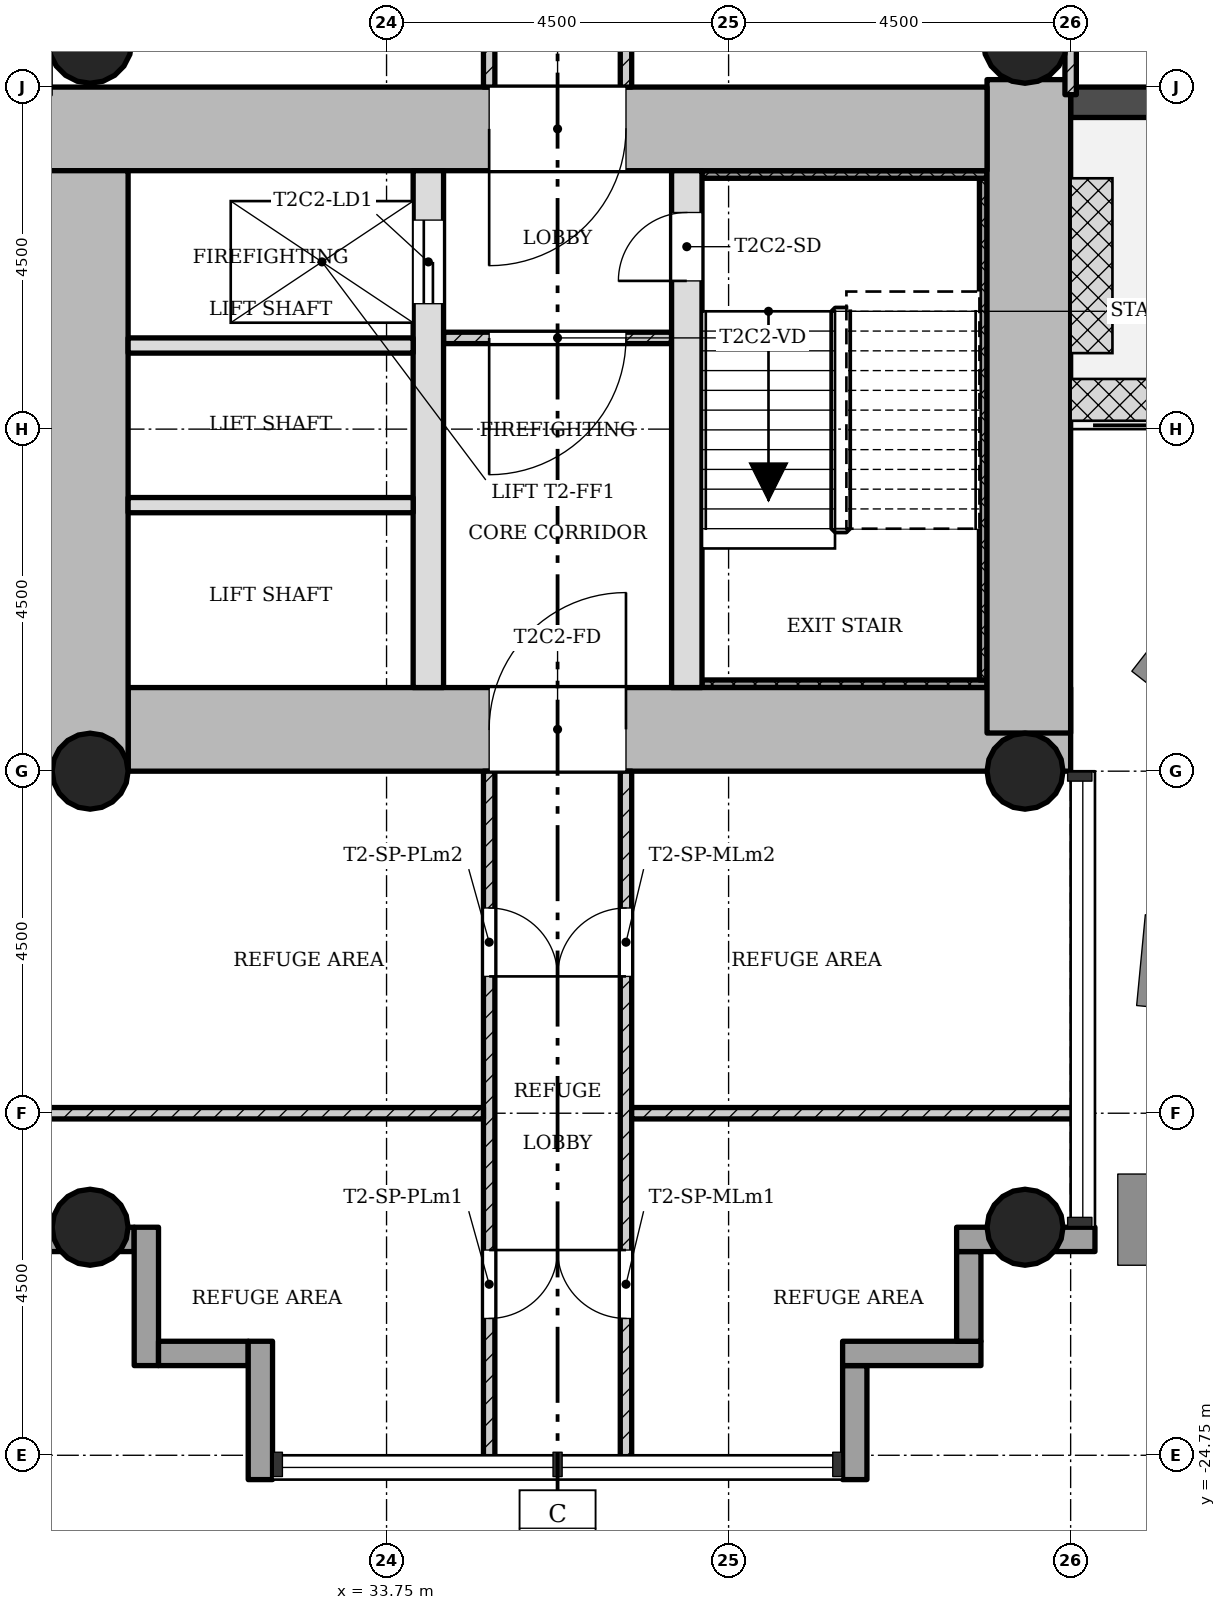
"""IFC4 building model, lengths in metres.
Left out: names, types, materials, properties, quantities, classifications, styles, units other than length and angle.
Written with IfcOpenShell. Run it as: python <this file> out.ifc"""

import sys

from ifc_helpers import new_model, si_unit, direction, frame, frame_2d, origin, origin_2d, place, context, subcontext, project, spatial, rectangle, hollow_circle, extrude, element, fill, save


model = new_model("IFC4")
c1 = context("Model", 3, precision=1e-05, world=origin(), true_north=direction((0.0, 1.0)))
c2 = subcontext(c1, "Body", "Model", "MODEL_VIEW")
j1 = project(units=[si_unit("LENGTHUNIT", "METRE"), si_unit("PLANEANGLEUNIT", "RADIAN")], contexts=[c1])
p1 = place(None, origin())
s1 = spatial("IfcSite", under=j1, at=p1, CompositionType="ELEMENT")
p2 = place(p1, origin())
s2 = spatial("IfcBuilding", under=s1, at=p2, CompositionType="ELEMENT")
p3 = place(p2, frame((0.0, 0.0, 72.1)))
s3 = spatial("IfcBuildingStorey", under=s2, at=p3, CompositionType="ELEMENT", Elevation=72.1)
p4 = place(p3, frame((30.35, -15.2, 0.0), z_axis=(0.0, 0.0, 1.0), x_axis=(1.0, 0.0, 0.0)))
e1 = element("IfcWall", 1, at=p4, inside=s3, PredefinedType="SHEAR", context=c2, shape_type="SweptSolid", body=[
    extrude(rectangle(XDim=12.4, YDim=1.1, at=frame_2d((6.2, 0.0))), origin(), (0.0, 0.0, 1.0), 4.5),
])
p5 = place(p4, frame((4.75, 0.0, 0.0)))
e2 = element("IfcOpeningElement", 2, at=p5, cuts=e1, PredefinedType="OPENING", context=c2, shape_type="SweptSolid", body=[
    extrude(rectangle(XDim=1.8, YDim=2.1, at=frame_2d((0.9, 1.05))), frame((0.0, 0.56, 0.0), z_axis=(0.0, -1.0, 0.0), x_axis=(1.0, 0.0, 0.0)), (0.0, 0.0, 1.0), 1.12),
])
p6 = place(p3, frame((42.2, -15.248, 0.0), z_axis=(0.0, 0.0, 1.0), x_axis=(0.0, 1.0, 0.0)))
e3 = element("IfcWall", 3, at=p6, inside=s3, PredefinedType="SHEAR", context=c2, shape_type="SweptSolid", body=[
    extrude(rectangle(XDim=8.596, YDim=1.1, at=frame_2d((4.298, 0.0))), origin(), (0.0, 0.0, 1.0), 4.5),
])
p7 = place(p3, frame((41.65, -7.3, 0.0), z_axis=(0.0, 0.0, 1.0), x_axis=(-1.0, 0.0, 0.0)))
e4 = element("IfcWall", 4, at=p7, inside=s3, PredefinedType="SHEAR", context=c2, shape_type="SweptSolid", body=[
    extrude(rectangle(XDim=12.4, YDim=1.1, at=frame_2d((6.2, 0.0))), origin(), (0.0, 0.0, 1.0), 4.5),
])
p8 = place(p7, frame((4.75, 0.0, 0.0)))
e5 = element("IfcOpeningElement", 5, at=p8, cuts=e4, PredefinedType="OPENING", context=c2, shape_type="SweptSolid", body=[
    extrude(rectangle(XDim=1.8, YDim=2.1, at=frame_2d((0.9, 1.05))), frame((0.0, 0.56, 0.0), z_axis=(0.0, -1.0, 0.0), x_axis=(1.0, 0.0, 0.0)), (0.0, 0.0, 1.0), 1.12),
])
p9 = place(p3, frame((29.8, -7.85, 0.0), z_axis=(0.0, 0.0, 1.0), x_axis=(0.0, -1.0, 0.0)))
e6 = element("IfcWall", 6, at=p9, inside=s3, PredefinedType="SHEAR", context=c2, shape_type="SweptSolid", body=[
    extrude(rectangle(XDim=7.9, YDim=1.1, at=frame_2d((3.95, 0.0))), origin(), (0.0, 0.0, 1.0), 4.5),
])
p10 = place(p3, frame((34.3, -14.65, 0.0), z_axis=(0.0, 0.0, 1.0), x_axis=(0.0, 1.0, 0.0)))
e7 = element("IfcWall", 7, at=p10, inside=s3, PredefinedType="SHEAR", context=c2, shape_type="SweptSolid", body=[
    extrude(rectangle(XDim=6.8, YDim=0.4, at=frame_2d((3.4, 0.0))), origin(), (0.0, 0.0, 1.0), 4.5),
])
p11 = place(p10, frame((5.05, 0.0, 0.0)))
e8 = element("IfcOpeningElement", 8, at=p11, cuts=e7, PredefinedType="OPENING", context=c2, shape_type="SweptSolid", body=[
    extrude(rectangle(XDim=1.1, YDim=2.1, at=frame_2d((0.55, 1.05))), frame((0.0, 0.21, 0.0), z_axis=(0.0, -1.0, 0.0), x_axis=(1.0, 0.0, 0.0)), (0.0, 0.0, 1.0), 0.42),
])
p12 = place(p3, frame((37.7, -14.65, 0.0), z_axis=(0.0, 0.0, 1.0), x_axis=(0.0, 1.0, 0.0)))
e9 = element("IfcWall", 9, at=p12, inside=s3, PredefinedType="SHEAR", context=c2, shape_type="SweptSolid", body=[
    extrude(rectangle(XDim=6.8, YDim=0.4, at=frame_2d((3.4, 0.0))), origin(), (0.0, 0.0, 1.0), 4.5),
])
p13 = place(p12, frame((5.35, 0.0, 0.0)))
e10 = element("IfcOpeningElement", 10, at=p13, cuts=e9, PredefinedType="OPENING", context=c2, shape_type="SweptSolid", body=[
    extrude(rectangle(XDim=0.9, YDim=2.1, at=frame_2d((0.45, 1.05))), frame((0.0, 0.21, 0.0), z_axis=(0.0, -1.0, 0.0), x_axis=(1.0, 0.0, 0.0)), (0.0, 0.0, 1.0), 0.42),
])
for number, where, z_axis, x_axis in (
    (11, (42.15, -15.75, 0.0), (0.0, 0.0, 1.0), (1.0, 0.0, 0.0)),
    (12, (29.85, -15.75, 0.0), (0.0, 0.0, 1.0), (1.0, 0.0, 0.0)),
    (13, (42.15, -21.75, 0.0), (0.0, 0.0, 1.0), (1.0, 0.0, 0.0)),
    (14, (29.85, -21.75, 0.0), (0.0, 0.0, 1.0), (1.0, 0.0, 0.0)),
):
    element("IfcColumn", number, at=place(p3, frame(where, z_axis=z_axis, x_axis=x_axis)), inside=s3, PredefinedType="COLUMN", context=c2, shape_type="SweptSolid", body=[
        extrude(hollow_circle(Radius=0.5, WallThickness=0.036, at=origin_2d()), origin(), (0.0, 0.0, 1.0), 4.5),
    ])
for number, where, z_axis, x_axis in (
    (15, (42.15, -6.15, 0.0), (0.0, 0.0, 1.0), (1.0, 0.0, 0.0)),
    (16, (29.85, -6.15, 0.0), (0.0, 0.0, 1.0), (1.0, 0.0, 0.0)),
):
    element("IfcColumn", number, at=place(p3, frame(where, z_axis=z_axis, x_axis=x_axis)), inside=s3, PredefinedType="COLUMN", context=c2, shape_type="SweptSolid", body=[
        extrude(hollow_circle(Radius=0.55, WallThickness=0.04, at=origin_2d()), origin(), (0.0, 0.0, 1.0), 4.5),
    ])
p14 = place(p3, frame((39.91, -25.07, -0.3), z_axis=(0.0, 0.0, 1.0), x_axis=(0.0, 1.0, 0.0)))
e17 = element("IfcWall", 17, at=p14, inside=s3, PredefinedType="STANDARD", context=c2, shape_type="SweptSolid", body=[
    extrude(rectangle(XDim=1.5, YDim=0.32, at=frame_2d((0.75, 0.0))), origin(), (0.0, 0.0, 1.0), 4.5),
])
p15 = place(p3, frame((39.75, -23.41, -0.3), z_axis=(0.0, 0.0, 1.0), x_axis=(1.0, 0.0, 0.0)))
e18 = element("IfcWall", 18, at=p15, inside=s3, PredefinedType="STANDARD", context=c2, shape_type="SweptSolid", body=[
    extrude(rectangle(XDim=1.82, YDim=0.32, at=frame_2d((0.91, 0.0))), origin(), (0.0, 0.0, 1.0), 4.5),
])
p16 = place(p3, frame((41.41, -23.25, -0.3), z_axis=(0.0, 0.0, 1.0), x_axis=(0.0, 1.0, 0.0)))
e19 = element("IfcWall", 19, at=p16, inside=s3, PredefinedType="STANDARD", context=c2, shape_type="SweptSolid", body=[
    extrude(rectangle(XDim=1.18, YDim=0.32, at=frame_2d((0.59, 0.0))), origin(), (0.0, 0.0, 1.0), 4.5),
])
p17 = place(p3, frame((41.25, -21.91, -0.3), z_axis=(0.0, 0.0, 1.0), x_axis=(1.0, 0.0, 0.0)))
e20 = element("IfcWall", 20, at=p17, inside=s3, PredefinedType="STANDARD", context=c2, shape_type="SweptSolid", body=[
    extrude(rectangle(XDim=1.82, YDim=0.32, at=frame_2d((0.91, 0.0))), origin(), (0.0, 0.0, 1.0), 4.5),
])
p18 = place(p3, frame((42.75, -6.95, -0.02), z_axis=(0.0, 0.0, 1.0), x_axis=(1.0, 0.0, 0.0)))
e21 = element("IfcWall", 21, at=p18, inside=s3, PredefinedType="STANDARD", context=c2, shape_type="SweptSolid", body=[
    extrude(rectangle(XDim=4.5, YDim=0.4, at=frame_2d((2.25, 0.0))), origin(), (0.0, 0.0, 1.0), 4.22),
])
p19 = place(p18, frame((1.35, 0.0, 0.02)))
e22 = element("IfcOpeningElement", 22, at=p19, cuts=e21, PredefinedType="OPENING", context=c2, shape_type="SweptSolid", body=[
    extrude(rectangle(XDim=1.8, YDim=2.1, at=frame_2d((0.9, 1.05))), frame((0.0, 0.21, 0.0), z_axis=(0.0, -1.0, 0.0), x_axis=(1.0, 0.0, 0.0)), (0.0, 0.0, 1.0), 0.42),
])
p20 = place(p3, frame((28.93, -21.91, -0.3), z_axis=(0.0, 0.0, 1.0), x_axis=(1.0, 0.0, 0.0)))
e23 = element("IfcWall", 23, at=p20, inside=s3, PredefinedType="STANDARD", context=c2, shape_type="SweptSolid", body=[
    extrude(rectangle(XDim=1.5, YDim=0.32, at=frame_2d((0.75, 0.0))), origin(), (0.0, 0.0, 1.0), 4.5),
])
p21 = place(p3, frame((30.59, -21.75, -0.3), z_axis=(0.0, 0.0, 1.0), x_axis=(0.0, -1.0, 0.0)))
e24 = element("IfcWall", 24, at=p21, inside=s3, PredefinedType="STANDARD", context=c2, shape_type="SweptSolid", body=[
    extrude(rectangle(XDim=1.82, YDim=0.32, at=frame_2d((0.91, 0.0))), origin(), (0.0, 0.0, 1.0), 4.5),
])
p22 = place(p3, frame((30.75, -23.41, -0.3), z_axis=(0.0, 0.0, 1.0), x_axis=(1.0, 0.0, 0.0)))
e25 = element("IfcWall", 25, at=p22, inside=s3, PredefinedType="STANDARD", context=c2, shape_type="SweptSolid", body=[
    extrude(rectangle(XDim=1.18, YDim=0.32, at=frame_2d((0.59, 0.0))), origin(), (0.0, 0.0, 1.0), 4.5),
])
p23 = place(p3, frame((32.09, -23.25, -0.3), z_axis=(0.0, 0.0, 1.0), x_axis=(0.0, -1.0, 0.0)))
e26 = element("IfcWall", 26, at=p23, inside=s3, PredefinedType="STANDARD", context=c2, shape_type="SweptSolid", body=[
    extrude(rectangle(XDim=1.82, YDim=0.32, at=frame_2d((0.91, 0.0))), origin(), (0.0, 0.0, 1.0), 4.5),
])
p24 = place(p3, frame((34.5, -10.05, 0.0), z_axis=(0.0, 0.0, 1.0), x_axis=(1.0, 0.0, 0.0)))
e27 = element("IfcWall", 27, at=p24, inside=s3, PredefinedType="PARTITIONING", context=c2, shape_type="SweptSolid", body=[
    extrude(rectangle(XDim=3.0, YDim=0.15, at=frame_2d((1.5, 0.0))), origin(), (0.0, 0.0, 1.0), 4.08),
])
p25 = place(p24, frame((0.6, 0.0, 0.0)))
e28 = element("IfcOpeningElement", 28, at=p25, cuts=e27, PredefinedType="OPENING", context=c2, shape_type="SweptSolid", body=[
    extrude(rectangle(XDim=1.8, YDim=2.1, at=frame_2d((0.9, 1.05))), frame((0.0, 0.085, 0.0), z_axis=(0.0, -1.0, 0.0), x_axis=(1.0, 0.0, 0.0)), (0.0, 0.0, 1.0), 0.17),
])
for number, where, z_axis, x_axis in (
    (29, (30.35, -10.15, 0.0), (0.0, 0.0, 1.0), (1.0, 0.0, 0.0)),
    (30, (30.35, -12.25, 0.0), (0.0, 0.0, 1.0), (1.0, 0.0, 0.0)),
):
    element("IfcWall", number, at=place(p3, frame(where, z_axis=z_axis, x_axis=x_axis)), inside=s3, PredefinedType="SOLIDWALL", context=c2, shape_type="SweptSolid", body=[
        extrude(rectangle(XDim=3.75, YDim=0.2, at=frame_2d((1.875, 0.0))), origin(), (0.0, 0.0, 1.0), 4.08),
    ])
p26 = place(p3, frame((35.1, -6.75, 0.0), z_axis=(0.0, 0.0, 1.0), x_axis=(0.0, 1.0, 0.0)))
e31 = element("IfcWall", 31, at=p26, inside=s3, PredefinedType="PARTITIONING", context=c2, shape_type="SweptSolid", body=[
    extrude(rectangle(XDim=5.85, YDim=0.15, at=frame_2d((2.925, 0.0))), origin(), (0.0, 0.0, 1.0), 4.08),
])
p27 = place(p26, frame((2.475, 0.0, 0.0)))
e32 = element("IfcOpeningElement", 32, at=p27, cuts=e31, PredefinedType="OPENING", context=c2, shape_type="SweptSolid", body=[
    extrude(rectangle(XDim=0.9, YDim=2.1, at=frame_2d((0.45, 1.05))), frame((0.0, 0.085, 0.0), z_axis=(0.0, -1.0, 0.0), x_axis=(1.0, 0.0, 0.0)), (0.0, 0.0, 1.0), 0.17),
])
p28 = place(p3, frame((36.9, -6.75, 0.0), z_axis=(0.0, 0.0, 1.0), x_axis=(0.0, 1.0, 0.0)))
e33 = element("IfcWall", 33, at=p28, inside=s3, PredefinedType="PARTITIONING", context=c2, shape_type="SweptSolid", body=[
    extrude(rectangle(XDim=5.85, YDim=0.15, at=frame_2d((2.925, 0.0))), origin(), (0.0, 0.0, 1.0), 4.08),
])
p29 = place(p28, frame((2.475, 0.0, 0.0)))
e34 = element("IfcOpeningElement", 34, at=p29, cuts=e33, PredefinedType="OPENING", context=c2, shape_type="SweptSolid", body=[
    extrude(rectangle(XDim=0.9, YDim=2.1, at=frame_2d((0.45, 1.05))), frame((0.0, 0.085, 0.0), z_axis=(0.0, -1.0, 0.0), x_axis=(1.0, 0.0, 0.0)), (0.0, 0.0, 1.0), 0.17),
])
p30 = place(p3, frame((35.1, -24.85, 0.0), z_axis=(0.0, 0.0, 1.0), x_axis=(0.0, 1.0, 0.0)))
e35 = element("IfcWall", 35, at=p30, inside=s3, PredefinedType="PARTITIONING", context=c2, shape_type="SweptSolid", body=[
    extrude(rectangle(XDim=9.1, YDim=0.15, at=frame_2d((4.55, 0.0))), origin(), (0.0, 0.0, 1.0), 4.08),
])
p31 = place(p30, frame((1.9, 0.0, 0.0)))
e36 = element("IfcOpeningElement", 36, at=p31, cuts=e35, PredefinedType="OPENING", context=c2, shape_type="SweptSolid", body=[
    extrude(rectangle(XDim=0.9, YDim=2.1, at=frame_2d((0.45, 1.05))), frame((0.0, 0.085, 0.0), z_axis=(0.0, -1.0, 0.0), x_axis=(1.0, 0.0, 0.0)), (0.0, 0.0, 1.0), 0.17),
])
p32 = place(p30, frame((6.4, 0.0, 0.0)))
e37 = element("IfcOpeningElement", 37, at=p32, cuts=e35, PredefinedType="OPENING", context=c2, shape_type="SweptSolid", body=[
    extrude(rectangle(XDim=0.9, YDim=2.1, at=frame_2d((0.45, 1.05))), frame((0.0, 0.085, 0.0), z_axis=(0.0, -1.0, 0.0), x_axis=(1.0, 0.0, 0.0)), (0.0, 0.0, 1.0), 0.17),
])
p33 = place(p3, frame((35.025, -20.25, 0.0), z_axis=(0.0, 0.0, 1.0), x_axis=(-1.0, 0.0, 0.0)))
e38 = element("IfcWall", 38, at=p33, inside=s3, PredefinedType="PARTITIONING", context=c2, shape_type="SweptSolid", body=[
    extrude(rectangle(XDim=5.875, YDim=0.15, at=frame_2d((2.938, 0.0))), origin(), (0.0, 0.0, 1.0), 4.08),
])
p34 = place(p3, frame((36.9, -24.85, 0.0), z_axis=(0.0, 0.0, 1.0), x_axis=(0.0, 1.0, 0.0)))
e39 = element("IfcWall", 39, at=p34, inside=s3, PredefinedType="PARTITIONING", context=c2, shape_type="SweptSolid", body=[
    extrude(rectangle(XDim=9.1, YDim=0.15, at=frame_2d((4.55, 0.0))), origin(), (0.0, 0.0, 1.0), 4.08),
])
p35 = place(p34, frame((1.9, 0.0, 0.0)))
e40 = element("IfcOpeningElement", 40, at=p35, cuts=e39, PredefinedType="OPENING", context=c2, shape_type="SweptSolid", body=[
    extrude(rectangle(XDim=0.9, YDim=2.1, at=frame_2d((0.45, 1.05))), frame((0.0, 0.085, 0.0), z_axis=(0.0, -1.0, 0.0), x_axis=(1.0, 0.0, 0.0)), (0.0, 0.0, 1.0), 0.17),
])
p36 = place(p34, frame((6.4, 0.0, 0.0)))
e41 = element("IfcOpeningElement", 41, at=p36, cuts=e39, PredefinedType="OPENING", context=c2, shape_type="SweptSolid", body=[
    extrude(rectangle(XDim=0.9, YDim=2.1, at=frame_2d((0.45, 1.05))), frame((0.0, 0.085, 0.0), z_axis=(0.0, -1.0, 0.0), x_axis=(1.0, 0.0, 0.0)), (0.0, 0.0, 1.0), 0.17),
])
p37 = place(p3, frame((36.975, -20.25, 0.0), z_axis=(0.0, 0.0, 1.0), x_axis=(1.0, 0.0, 0.0)))
e42 = element("IfcWall", 42, at=p37, inside=s3, PredefinedType="PARTITIONING", context=c2, shape_type="SweptSolid", body=[
    extrude(rectangle(XDim=5.875, YDim=0.15, at=frame_2d((2.938, 0.0))), origin(), (0.0, 0.0, 1.0), 4.08),
])
p38 = place(p3, frame((42.75, -6.85, 0.0), z_axis=(0.0, 0.0, 1.0), x_axis=(0.0, 1.0, 0.0)))
e43 = element("IfcWall", 43, at=p38, inside=s3, PredefinedType="PARTITIONING", context=c2, shape_type="SweptSolid", body=[
    extrude(rectangle(XDim=13.7, YDim=0.15, at=frame_2d((6.85, 0.0))), origin(), (0.0, 0.0, 1.0), 4.08),
])
p39 = place(p38, frame((5.95, 0.0, 0.0)))
e44 = element("IfcOpeningElement", 44, at=p39, cuts=e43, PredefinedType="OPENING", context=c2, shape_type="SweptSolid", body=[
    extrude(rectangle(XDim=1.8, YDim=2.1, at=frame_2d((0.9, 1.05))), frame((0.0, 0.085, 0.0), z_axis=(0.0, -1.0, 0.0), x_axis=(1.0, 0.0, 0.0)), (0.0, 0.0, 1.0), 0.17),
])
p40 = place(p3, frame((37.9, -14.6, 0.0), z_axis=(0.0, 0.0, 1.0), x_axis=(1.0, 0.0, 0.0)))
e45 = element("IfcWall", 45, at=p40, inside=s3, PredefinedType="SHEAR", context=c2, shape_type="SweptSolid", body=[
    extrude(rectangle(XDim=3.75, YDim=0.1, at=frame_2d((1.875, 0.0))), origin(), (0.0, 0.0, 1.0), 4.5),
])
p41 = place(p3, frame((41.6, -7.95, 0.0), z_axis=(0.0, 0.0, 1.0), x_axis=(0.0, -1.0, 0.0)))
e46 = element("IfcWall", 46, at=p41, inside=s3, PredefinedType="SHEAR", context=c2, shape_type="SweptSolid", body=[
    extrude(rectangle(XDim=6.6, YDim=0.1, at=frame_2d((3.3, 0.0))), origin(), (0.0, 0.0, 1.0), 4.5),
])
p42 = place(p3, frame((37.9, -7.9, 0.0), z_axis=(0.0, 0.0, 1.0), x_axis=(1.0, 0.0, 0.0)))
e47 = element("IfcWall", 47, at=p42, inside=s3, PredefinedType="SHEAR", context=c2, shape_type="SweptSolid", body=[
    extrude(rectangle(XDim=3.75, YDim=0.1, at=frame_2d((1.875, 0.0))), origin(), (0.0, 0.0, 1.0), 4.5),
])
p43 = place(p25, origin())
e48 = element("IfcDoor", 48, at=p43, inside=s3, OperationType="SINGLE_SWING_LEFT", PredefinedType="DOOR", context=c2, shape_type="SweptSolid", body=[
    extrude(rectangle(XDim=1.8, YDim=2.1, at=frame_2d((0.9, 1.05))), frame((0.0, 0.025, 0.0), z_axis=(0.0, -1.0, 0.0), x_axis=(1.0, 0.0, 0.0)), (0.0, 0.0, 1.0), 0.05),
])
fill(e28, e48)
p44 = place(p31, origin())
e49 = element("IfcDoor", 49, at=p44, inside=s3, OperationType="SINGLE_SWING_RIGHT", PredefinedType="DOOR", context=c2, shape_type="SweptSolid", body=[
    extrude(rectangle(XDim=0.9, YDim=2.1, at=frame_2d((0.45, 1.05))), frame((0.0, 0.025, 0.0), z_axis=(0.0, -1.0, 0.0), x_axis=(1.0, 0.0, 0.0)), (0.0, 0.0, 1.0), 0.05),
])
fill(e36, e49)
p45 = place(p32, origin())
e50 = element("IfcDoor", 50, at=p45, inside=s3, OperationType="SINGLE_SWING_LEFT", PredefinedType="DOOR", context=c2, shape_type="SweptSolid", body=[
    extrude(rectangle(XDim=0.9, YDim=2.1, at=frame_2d((0.45, 1.05))), frame((0.0, 0.025, 0.0), z_axis=(0.0, -1.0, 0.0), x_axis=(1.0, 0.0, 0.0)), (0.0, 0.0, 1.0), 0.05),
])
fill(e37, e50)
p46 = place(p35, origin())
e51 = element("IfcDoor", 51, at=p46, inside=s3, OperationType="SINGLE_SWING_LEFT", PredefinedType="DOOR", context=c2, shape_type="SweptSolid", body=[
    extrude(rectangle(XDim=0.9, YDim=2.1, at=frame_2d((0.45, 1.05))), frame((0.0, 0.025, 0.0), z_axis=(0.0, -1.0, 0.0), x_axis=(1.0, 0.0, 0.0)), (0.0, 0.0, 1.0), 0.05),
])
fill(e40, e51)
p47 = place(p36, origin())
e52 = element("IfcDoor", 52, at=p47, inside=s3, OperationType="SINGLE_SWING_RIGHT", PredefinedType="DOOR", context=c2, shape_type="SweptSolid", body=[
    extrude(rectangle(XDim=0.9, YDim=2.1, at=frame_2d((0.45, 1.05))), frame((0.0, 0.025, 0.0), z_axis=(0.0, -1.0, 0.0), x_axis=(1.0, 0.0, 0.0)), (0.0, 0.0, 1.0), 0.05),
])
fill(e41, e52)
p48 = place(p13, origin())
e53 = element("IfcDoor", 53, at=p48, inside=s3, OperationType="SINGLE_SWING_RIGHT", PredefinedType="DOOR", context=c2, shape_type="SweptSolid", body=[
    extrude(rectangle(XDim=0.9, YDim=2.1, at=frame_2d((0.45, 1.05))), frame((0.0, 0.025, 0.0), z_axis=(0.0, -1.0, 0.0), x_axis=(1.0, 0.0, 0.0)), (0.0, 0.0, 1.0), 0.05),
])
fill(e10, e53)
p49 = place(p11, origin())
e54 = element("IfcDoor", 54, at=p49, inside=s3, OperationType="SLIDING_TO_LEFT", PredefinedType="DOOR", context=c2, shape_type="SweptSolid", body=[
    extrude(rectangle(XDim=1.1, YDim=2.1, at=frame_2d((0.55, 1.05))), frame((0.0, 0.025, 0.0), z_axis=(0.0, -1.0, 0.0), x_axis=(1.0, 0.0, 0.0)), (0.0, 0.0, 1.0), 0.05),
])
fill(e8, e54)
p50 = place(p8, origin())
e55 = element("IfcDoor", 55, at=p50, inside=s3, OperationType="SINGLE_SWING_LEFT", PredefinedType="DOOR", context=c2, shape_type="SweptSolid", body=[
    extrude(rectangle(XDim=1.8, YDim=2.1, at=frame_2d((0.9, 1.05))), frame((0.0, 0.025, 0.0), z_axis=(0.0, -1.0, 0.0), x_axis=(1.0, 0.0, 0.0)), (0.0, 0.0, 1.0), 0.05),
])
fill(e5, e55)
p51 = place(p5, origin())
e56 = element("IfcDoor", 56, at=p51, inside=s3, OperationType="SINGLE_SWING_LEFT", PredefinedType="DOOR", context=c2, shape_type="SweptSolid", body=[
    extrude(rectangle(XDim=1.8, YDim=2.1, at=frame_2d((0.9, 1.05))), frame((0.0, 0.025, 0.0), z_axis=(0.0, -1.0, 0.0), x_axis=(1.0, 0.0, 0.0)), (0.0, 0.0, 1.0), 0.05),
])
fill(e2, e56)
save(model, sys.argv[1])
